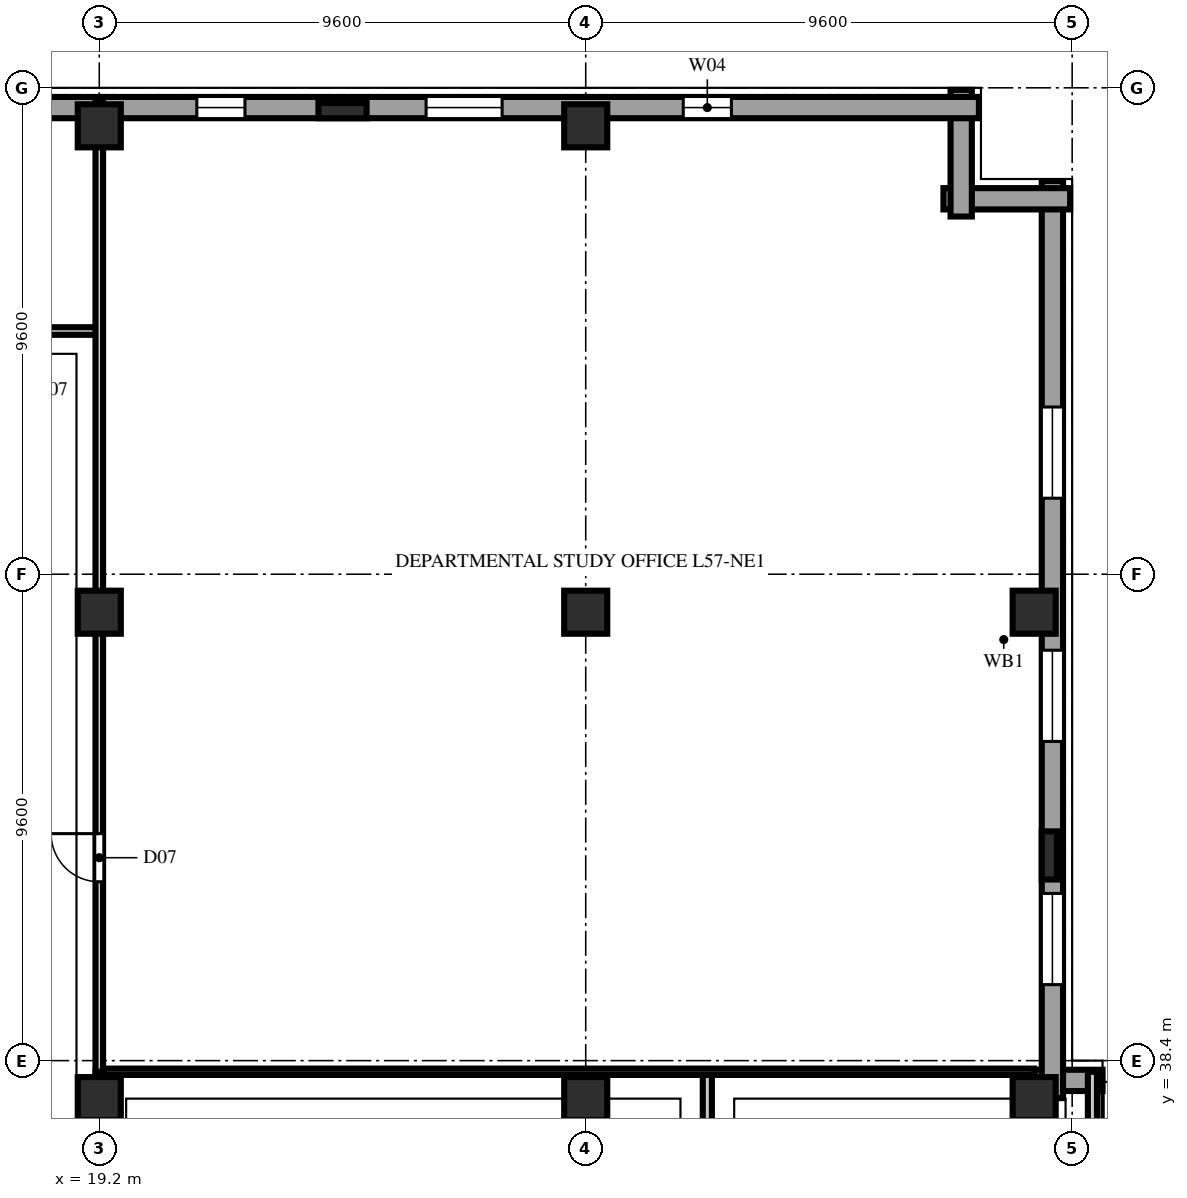
"""IFC4 building model, lengths in metres.
Left out: names, types, materials, properties, quantities, classifications, styles, units other than length and angle.
Written with IfcOpenShell. Run it as: python <this file> out.ifc"""

import sys

from ifc_helpers import new_model, si_unit, direction, frame, frame_2d, origin, origin_2d, place, context, subcontext, project, spatial, rectangle, extrude, element, fill, save


model = new_model("IFC4")
c1 = context("Model", 3, precision=1e-05, world=origin(), true_north=direction((0.0, 1.0)))
c2 = subcontext(c1, "Body", "Model", "MODEL_VIEW")
j1 = project(units=[si_unit("LENGTHUNIT", "METRE"), si_unit("PLANEANGLEUNIT", "RADIAN")], contexts=[c1])
p1 = place(None, origin())
s1 = spatial("IfcSite", under=j1, at=p1, CompositionType="ELEMENT")
p2 = place(p1, origin())
s2 = spatial("IfcBuilding", under=s1, at=p2, CompositionType="ELEMENT")
p3 = place(p2, frame((0.0, 0.0, 225.6)))
s3 = spatial("IfcBuildingStorey", under=s2, at=p3, CompositionType="ELEMENT", Elevation=225.6)
for number, where, z_axis, x_axis in (
    (1, (19.2, 37.65, 0.0), (0.0, 0.0, 1.0), (1.0, 0.0, 0.0)),
    (2, (19.2, 47.25, 0.0), (0.0, 0.0, 1.0), (1.0, 0.0, 0.0)),
    (3, (19.2, 56.85, 0.0), (0.0, 0.0, 1.0), (1.0, 0.0, 0.0)),
    (4, (28.8, 37.65, 0.0), (0.0, 0.0, 1.0), (1.0, 0.0, 0.0)),
    (5, (28.8, 47.25, 0.0), (0.0, 0.0, 1.0), (1.0, 0.0, 0.0)),
    (6, (28.8, 56.85, 0.0), (0.0, 0.0, 1.0), (1.0, 0.0, 0.0)),
    (7, (37.65, 37.65, 0.0), (0.0, 0.0, 1.0), (1.0, 0.0, 0.0)),
    (8, (37.65, 47.25, 0.0), (0.0, 0.0, 1.0), (1.0, 0.0, 0.0)),
):
    element("IfcColumn", number, at=place(p3, frame(where, z_axis=z_axis, x_axis=x_axis)), inside=s3, PredefinedType="COLUMN", context=c2, shape_type="SweptSolid", body=[
        extrude(rectangle(XDim=0.85, YDim=0.85, at=origin_2d()), origin(), (0.0, 0.0, 1.0), 3.8),
    ])
for number, where, z_axis, x_axis in (
    (9, (24.0, 57.15, 0.0), (0.0, 0.0, 1.0), (1.0, 0.0, 0.0)),
    (10, (37.95, 42.45, 0.0), (0.0, 0.0, 1.0), (0.0, 1.0, 0.0)),
):
    element("IfcColumn", number, at=place(p3, frame(where, z_axis=z_axis, x_axis=x_axis)), inside=s3, PredefinedType="PILASTER", context=c2, shape_type="SweptSolid", body=[
        extrude(rectangle(XDim=0.95, YDim=0.3, at=origin_2d()), origin(), (0.0, 0.0, 1.0), 3.8),
    ])
p4 = place(p3, frame((39.0, 38.01, 0.0), z_axis=(0.0, 0.0, 1.0), x_axis=(-1.0, 0.0, 0.0)))
e11 = element("IfcWall", 11, at=p4, inside=s3, PredefinedType="SOLIDWALL", context=c2, shape_type="SweptSolid", body=[
    extrude(rectangle(XDim=1.34, YDim=0.42, at=frame_2d((0.67, 0.0))), origin(), (0.0, 0.0, 1.0), 2.14),
])
p5 = place(p3, frame((38.01, 37.66, 0.0), z_axis=(0.0, 0.0, 1.0), x_axis=(0.0, 1.0, 0.0)))
e12 = element("IfcWall", 12, at=p5, inside=s3, PredefinedType="SOLIDWALL", context=c2, shape_type="SweptSolid", body=[
    extrude(rectangle(XDim=18.1, YDim=0.42, at=frame_2d((9.05, 0.0))), origin(), (0.0, 0.0, 1.0), 3.54),
])
p6 = place(p5, frame((2.24, 0.0, 0.85)))
e13 = element("IfcOpeningElement", 13, at=p6, cuts=e12, PredefinedType="OPENING", context=c2, shape_type="SweptSolid", body=[
    extrude(rectangle(XDim=1.8, YDim=1.85, at=frame_2d((0.9, 0.925))), frame((0.0, 0.222, 0.0), z_axis=(0.0, -1.0, 0.0), x_axis=(1.0, 0.0, 0.0)), (0.0, 0.0, 1.0), 0.444),
])
p7 = place(p5, frame((7.04, 0.0, 0.85)))
e14 = element("IfcOpeningElement", 14, at=p7, cuts=e12, PredefinedType="OPENING", context=c2, shape_type="SweptSolid", body=[
    extrude(rectangle(XDim=1.8, YDim=1.85, at=frame_2d((0.9, 0.925))), frame((0.0, 0.222, 0.0), z_axis=(0.0, -1.0, 0.0), x_axis=(1.0, 0.0, 0.0)), (0.0, 0.0, 1.0), 0.444),
])
p8 = place(p5, frame((11.84, 0.0, 0.85)))
e15 = element("IfcOpeningElement", 15, at=p8, cuts=e12, PredefinedType="OPENING", context=c2, shape_type="SweptSolid", body=[
    extrude(rectangle(XDim=1.8, YDim=1.85, at=frame_2d((0.9, 0.925))), frame((0.0, 0.222, 0.0), z_axis=(0.0, -1.0, 0.0), x_axis=(1.0, 0.0, 0.0)), (0.0, 0.0, 1.0), 0.444),
])
for number, where, z_axis, x_axis in (
    (16, (38.36, 55.41, 0.0), (0.0, 0.0, 1.0), (-1.0, 0.0, 0.0)),
    (17, (36.21, 55.06, 0.0), (0.0, 0.0, 1.0), (0.0, 1.0, 0.0)),
):
    element("IfcWall", number, at=place(p3, frame(where, z_axis=z_axis, x_axis=x_axis)), inside=s3, PredefinedType="SOLIDWALL", context=c2, shape_type="SweptSolid", body=[
        extrude(rectangle(XDim=2.5, YDim=0.42, at=frame_2d((1.25, 0.0))), origin(), (0.0, 0.0, 1.0), 3.54),
    ])
p9 = place(p3, frame((36.56, 57.21, 0.0), z_axis=(0.0, 0.0, 1.0), x_axis=(-1.0, 0.0, 0.0)))
e18 = element("IfcWall", 18, at=p9, inside=s3, PredefinedType="SOLIDWALL", context=c2, shape_type="SweptSolid", body=[
    extrude(rectangle(XDim=34.72, YDim=0.42, at=frame_2d((17.36, 0.0))), origin(), (0.0, 0.0, 1.0), 3.54),
])
p10 = place(p9, frame((4.885, 0.0, 0.9)))
e19 = element("IfcOpeningElement", 19, at=p10, cuts=e18, PredefinedType="OPENING", context=c2, shape_type="SweptSolid", body=[
    extrude(rectangle(XDim=0.95, YDim=1.85, at=frame_2d((0.475, 0.925))), frame((0.0, 0.222, 0.0), z_axis=(0.0, -1.0, 0.0), x_axis=(1.0, 0.0, 0.0)), (0.0, 0.0, 1.0), 0.444),
])
p11 = place(p9, frame((9.41, 0.0, 0.9)))
e20 = element("IfcOpeningElement", 20, at=p11, cuts=e18, PredefinedType="OPENING", context=c2, shape_type="SweptSolid", body=[
    extrude(rectangle(XDim=1.5, YDim=1.85, at=frame_2d((0.75, 0.925))), frame((0.0, 0.222, 0.0), z_axis=(0.0, -1.0, 0.0), x_axis=(1.0, 0.0, 0.0)), (0.0, 0.0, 1.0), 0.444),
])
p12 = place(p9, frame((14.485, 0.0, 0.9)))
e21 = element("IfcOpeningElement", 21, at=p12, cuts=e18, PredefinedType="OPENING", context=c2, shape_type="SweptSolid", body=[
    extrude(rectangle(XDim=0.95, YDim=1.85, at=frame_2d((0.475, 0.925))), frame((0.0, 0.222, 0.0), z_axis=(0.0, -1.0, 0.0), x_axis=(1.0, 0.0, 0.0)), (0.0, 0.0, 1.0), 0.444),
])
p13 = place(p3, frame((17.05, 52.8, 0.0), z_axis=(0.0, 0.0, 1.0), x_axis=(1.0, 0.0, 0.0)))
e22 = element("IfcWall", 22, at=p13, inside=s3, PredefinedType="PARTITIONING", context=c2, shape_type="SweptSolid", body=[
    extrude(rectangle(XDim=2.15, YDim=0.15, at=frame_2d((1.075, 0.0))), origin(), (0.0, 0.0, 1.0), 3.54),
])
for number, where, z_axis, x_axis in (
    (23, (31.2, 26.7, 0.0), (0.0, 0.0, 1.0), (0.0, 1.0, 0.0)),
    (24, (38.8, 26.7, 0.0), (0.0, 0.0, 1.0), (0.0, 1.0, 0.0)),
):
    element("IfcWall", number, at=place(p3, frame(where, z_axis=z_axis, x_axis=x_axis)), inside=s3, PredefinedType="PARTITIONING", context=c2, shape_type="SweptSolid", body=[
        extrude(rectangle(XDim=11.48, YDim=0.18, at=frame_2d((5.74, 0.0))), origin(), (0.0, 0.0, 1.0), 3.54),
    ])
p14 = place(p3, frame((19.2, 26.7, 0.0), z_axis=(0.0, 0.0, 1.0), x_axis=(0.0, 1.0, 0.0)))
e25 = element("IfcWall", 25, at=p14, inside=s3, PredefinedType="PARTITIONING", context=c2, shape_type="SweptSolid", body=[
    extrude(rectangle(XDim=11.48, YDim=0.15, at=frame_2d((5.74, 0.0))), origin(), (0.0, 0.0, 1.0), 2.923),
])
p15 = place(p3, frame((19.28, 38.18, 0.0), z_axis=(0.0, 0.0, 1.0), x_axis=(1.0, 0.0, 0.0)))
e26 = element("IfcWall", 26, at=p15, inside=s3, PredefinedType="PARTITIONING", context=c2, shape_type="SweptSolid", body=[
    extrude(rectangle(XDim=18.37, YDim=0.125, at=frame_2d((9.185, 0.0))), origin(), (0.0, 0.0, 1.0), 3.54),
])
p16 = place(p3, frame((19.2, 38.18, 0.0), z_axis=(0.0, 0.0, 1.0), x_axis=(0.0, 1.0, 0.0)))
e27 = element("IfcWall", 27, at=p16, inside=s3, PredefinedType="PARTITIONING", context=c2, shape_type="SweptSolid", body=[
    extrude(rectangle(XDim=18.67, YDim=0.15, at=frame_2d((9.335, 0.0))), origin(), (0.0, 0.0, 1.0), 2.923),
])
p17 = place(p16, frame((3.75, 0.0, 0.0)))
e28 = element("IfcOpeningElement", 28, at=p17, cuts=e27, PredefinedType="OPENING", context=c2, shape_type="SweptSolid", body=[
    extrude(rectangle(XDim=0.95, YDim=2.15, at=frame_2d((0.475, 1.075))), frame((0.0, 0.087, 0.0), z_axis=(0.0, -1.0, 0.0), x_axis=(1.0, 0.0, 0.0)), (0.0, 0.0, 1.0), 0.174),
])
p18 = place(p3, frame((19.2, 56.85, 0.0), z_axis=(0.0, 0.0, 1.0), x_axis=(0.0, 1.0, 0.0)))
e29 = element("IfcWall", 29, at=p18, inside=s3, PredefinedType="PARTITIONING", context=c2, shape_type="SweptSolid", body=[
    extrude(rectangle(XDim=0.53, YDim=0.15, at=frame_2d((0.265, 0.0))), origin(), (0.0, 0.0, 1.0), 3.54),
])
p19 = place(p6, origin())
e30 = element("IfcWindow", 30, at=p19, inside=s3, PartitioningType="DOUBLE_PANEL_VERTICAL", PredefinedType="WINDOW", context=c2, shape_type="SweptSolid", body=[
    extrude(rectangle(XDim=1.8, YDim=1.85, at=frame_2d((0.9, 0.925))), frame((0.0, 0.11, 0.0), z_axis=(0.0, -1.0, 0.0), x_axis=(1.0, 0.0, 0.0)), (0.0, 0.0, 1.0), 0.06),
])
fill(e13, e30)
p20 = place(p7, origin())
e31 = element("IfcWindow", 31, at=p20, inside=s3, PartitioningType="DOUBLE_PANEL_VERTICAL", PredefinedType="WINDOW", context=c2, shape_type="SweptSolid", body=[
    extrude(rectangle(XDim=1.8, YDim=1.85, at=frame_2d((0.9, 0.925))), frame((0.0, 0.11, 0.0), z_axis=(0.0, -1.0, 0.0), x_axis=(1.0, 0.0, 0.0)), (0.0, 0.0, 1.0), 0.06),
])
fill(e14, e31)
p21 = place(p8, origin())
e32 = element("IfcWindow", 32, at=p21, inside=s3, PartitioningType="DOUBLE_PANEL_VERTICAL", PredefinedType="WINDOW", context=c2, shape_type="SweptSolid", body=[
    extrude(rectangle(XDim=1.8, YDim=1.85, at=frame_2d((0.9, 0.925))), frame((0.0, 0.11, 0.0), z_axis=(0.0, -1.0, 0.0), x_axis=(1.0, 0.0, 0.0)), (0.0, 0.0, 1.0), 0.06),
])
fill(e15, e32)
p22 = place(p10, origin())
e33 = element("IfcWindow", 33, at=p22, inside=s3, PartitioningType="SINGLE_PANEL", PredefinedType="WINDOW", context=c2, shape_type="SweptSolid", body=[
    extrude(rectangle(XDim=0.95, YDim=1.85, at=frame_2d((0.475, 0.925))), frame((0.0, 0.11, 0.0), z_axis=(0.0, -1.0, 0.0), x_axis=(1.0, 0.0, 0.0)), (0.0, 0.0, 1.0), 0.06),
])
fill(e19, e33)
p23 = place(p11, origin())
e34 = element("IfcWindow", 34, at=p23, inside=s3, PartitioningType="DOUBLE_PANEL_VERTICAL", PredefinedType="WINDOW", context=c2, shape_type="SweptSolid", body=[
    extrude(rectangle(XDim=1.5, YDim=1.85, at=frame_2d((0.75, 0.925))), frame((0.0, 0.11, 0.0), z_axis=(0.0, -1.0, 0.0), x_axis=(1.0, 0.0, 0.0)), (0.0, 0.0, 1.0), 0.06),
])
fill(e20, e34)
p24 = place(p12, origin())
e35 = element("IfcWindow", 35, at=p24, inside=s3, PartitioningType="SINGLE_PANEL", PredefinedType="WINDOW", context=c2, shape_type="SweptSolid", body=[
    extrude(rectangle(XDim=0.95, YDim=1.85, at=frame_2d((0.475, 0.925))), frame((0.0, 0.11, 0.0), z_axis=(0.0, -1.0, 0.0), x_axis=(1.0, 0.0, 0.0)), (0.0, 0.0, 1.0), 0.06),
])
fill(e21, e35)
p25 = place(p17, origin())
e36 = element("IfcDoor", 36, at=p25, inside=s3, OperationType="SINGLE_SWING_RIGHT", PredefinedType="DOOR", context=c2, shape_type="SweptSolid", body=[
    extrude(rectangle(XDim=0.95, YDim=2.15, at=frame_2d((0.475, 1.075))), frame((0.0, 0.025, 0.0), z_axis=(0.0, -1.0, 0.0), x_axis=(1.0, 0.0, 0.0)), (0.0, 0.0, 1.0), 0.05),
])
fill(e28, e36)
save(model, sys.argv[1])
